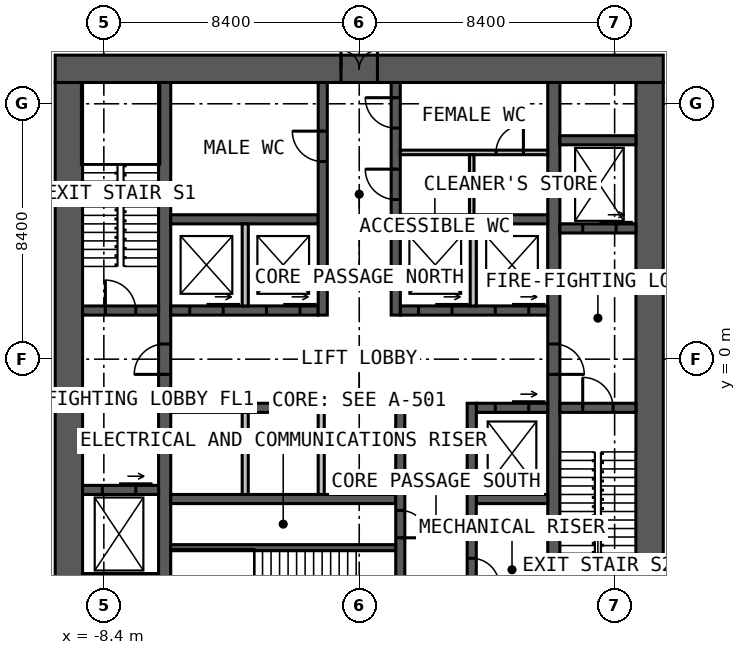
"""IFC4 building model, lengths in metres.
Left out: names, types, materials, properties, quantities, classifications, styles, units other than length and angle.
Written with IfcOpenShell. Run it as: python <this file> out.ifc"""

import sys

from ifc_helpers import new_model, si_unit, direction, frame, frame_2d, origin, place, context, subcontext, project, spatial, rectangle, extrude, element, fill, save


model = new_model("IFC4")
c1 = context("Model", 3, precision=1e-05, world=origin(), true_north=direction((0.0, 1.0)))
c2 = subcontext(c1, "Body", "Model", "MODEL_VIEW")
j1 = project(units=[si_unit("LENGTHUNIT", "METRE"), si_unit("PLANEANGLEUNIT", "RADIAN")], contexts=[c1])
p1 = place(None, origin())
s1 = spatial("IfcSite", under=j1, at=p1, CompositionType="ELEMENT")
p2 = place(p1, origin())
s2 = spatial("IfcBuilding", under=s1, at=p2, CompositionType="ELEMENT")
p3 = place(p2, frame((0.0, 0.0, -13.5)))
s3 = spatial("IfcBuildingStorey", under=s2, at=p3, CompositionType="ELEMENT", Elevation=-13.5)
p4 = place(p3, frame((-10.0, 9.55, 0.0), z_axis=(0.0, 0.0, 1.0), x_axis=(1.0, 0.0, 0.0)))
e1 = element("IfcWall", 1, at=p4, inside=s3, PredefinedType="SOLIDWALL", context=c2, shape_type="SweptSolid", body=[
    extrude(rectangle(XDim=20.0, YDim=0.9, at=frame_2d((10.0, 0.0))), origin(), (0.0, 0.0, 1.0), 4.5),
])
p5 = place(p4, frame((9.4, 0.0, 0.0)))
e2 = element("IfcOpeningElement", 2, at=p5, cuts=e1, PredefinedType="OPENING", context=c2, shape_type="SweptSolid", body=[
    extrude(rectangle(XDim=1.2, YDim=2.2, at=frame_2d((0.6, 1.1))), frame((0.0, 0.46, 0.0), z_axis=(0.0, -1.0, 0.0), x_axis=(1.0, 0.0, 0.0)), (0.0, 0.0, 1.0), 0.92),
])
for number, where, z_axis, x_axis in (
    (3, (9.55, -9.1, 0.0), (0.0, 0.0, 1.0), (0.0, 1.0, 0.0)),
    (4, (-9.55, 9.1, 0.0), (0.0, 0.0, 1.0), (0.0, -1.0, 0.0)),
):
    element("IfcWall", number, at=place(p3, frame(where, z_axis=z_axis, x_axis=x_axis)), inside=s3, PredefinedType="SOLIDWALL", context=c2, shape_type="SweptSolid", body=[
        extrude(rectangle(XDim=18.2, YDim=0.9, at=frame_2d((9.1, 0.0))), origin(), (0.0, 0.0, 1.0), 4.5),
    ])
p6 = place(p3, frame((-6.4, -9.1, 0.0), z_axis=(0.0, 0.0, 1.0), x_axis=(0.0, 1.0, 0.0)))
e5 = element("IfcWall", 5, at=p6, inside=s3, PredefinedType="SOLIDWALL", context=c2, shape_type="SweptSolid", body=[
    extrude(rectangle(XDim=18.2, YDim=0.4, at=frame_2d((9.1, 0.0))), origin(), (0.0, 0.0, 1.0), 4.5),
])
p7 = place(p6, frame((8.6, 0.0, 0.0)))
e6 = element("IfcOpeningElement", 6, at=p7, cuts=e5, PredefinedType="OPENING", context=c2, shape_type="SweptSolid", body=[
    extrude(rectangle(XDim=1.0, YDim=2.2, at=frame_2d((0.5, 1.1))), frame((0.0, 0.21, 0.0), z_axis=(0.0, -1.0, 0.0), x_axis=(1.0, 0.0, 0.0)), (0.0, 0.0, 1.0), 0.42),
])
p8 = place(p3, frame((6.4, 9.1, 0.0), z_axis=(0.0, 0.0, 1.0), x_axis=(0.0, -1.0, 0.0)))
e7 = element("IfcWall", 7, at=p8, inside=s3, PredefinedType="SOLIDWALL", context=c2, shape_type="SweptSolid", body=[
    extrude(rectangle(XDim=18.2, YDim=0.4, at=frame_2d((9.1, 0.0))), origin(), (0.0, 0.0, 1.0), 4.5),
])
p9 = place(p8, frame((8.6, 0.0, 0.0)))
e8 = element("IfcOpeningElement", 8, at=p9, cuts=e7, PredefinedType="OPENING", context=c2, shape_type="SweptSolid", body=[
    extrude(rectangle(XDim=1.0, YDim=2.2, at=frame_2d((0.5, 1.1))), frame((0.0, 0.21, 0.0), z_axis=(0.0, -1.0, 0.0), x_axis=(1.0, 0.0, 0.0)), (0.0, 0.0, 1.0), 0.42),
])
p10 = place(p3, frame((-6.2, 1.6, 0.0), z_axis=(0.0, 0.0, 1.0), x_axis=(1.0, 0.0, 0.0)))
e9 = element("IfcWall", 9, at=p10, inside=s3, PredefinedType="SOLIDWALL", context=c2, shape_type="SweptSolid", body=[
    extrude(rectangle(XDim=4.85, YDim=0.3, at=frame_2d((2.425, 0.0))), origin(), (0.0, 0.0, 1.0), 4.5),
])
p11 = place(p10, frame((0.625, 0.0, 0.0)))
e10 = element("IfcOpeningElement", 10, at=p11, cuts=e9, PredefinedType="OPENING", context=c2, shape_type="SweptSolid", body=[
    extrude(rectangle(XDim=1.1, YDim=2.2, at=frame_2d((0.55, 1.1))), frame((0.0, 0.16, 0.0), z_axis=(0.0, -1.0, 0.0), x_axis=(1.0, 0.0, 0.0)), (0.0, 0.0, 1.0), 0.32),
])
p12 = place(p10, frame((3.15, 0.0, 0.0)))
e11 = element("IfcOpeningElement", 11, at=p12, cuts=e9, PredefinedType="OPENING", context=c2, shape_type="SweptSolid", body=[
    extrude(rectangle(XDim=1.1, YDim=2.2, at=frame_2d((0.55, 1.1))), frame((0.0, 0.16, 0.0), z_axis=(0.0, -1.0, 0.0), x_axis=(1.0, 0.0, 0.0)), (0.0, 0.0, 1.0), 0.32),
])
p13 = place(p3, frame((1.35, 1.6, 0.0), z_axis=(0.0, 0.0, 1.0), x_axis=(1.0, 0.0, 0.0)))
e12 = element("IfcWall", 12, at=p13, inside=s3, PredefinedType="SOLIDWALL", context=c2, shape_type="SweptSolid", body=[
    extrude(rectangle(XDim=4.85, YDim=0.3, at=frame_2d((2.425, 0.0))), origin(), (0.0, 0.0, 1.0), 4.5),
])
p14 = place(p13, frame((0.6, 0.0, 0.0)))
e13 = element("IfcOpeningElement", 13, at=p14, cuts=e12, PredefinedType="OPENING", context=c2, shape_type="SweptSolid", body=[
    extrude(rectangle(XDim=1.1, YDim=2.2, at=frame_2d((0.55, 1.1))), frame((0.0, 0.16, 0.0), z_axis=(0.0, -1.0, 0.0), x_axis=(1.0, 0.0, 0.0)), (0.0, 0.0, 1.0), 0.32),
])
p15 = place(p13, frame((3.125, 0.0, 0.0)))
e14 = element("IfcOpeningElement", 14, at=p15, cuts=e12, PredefinedType="OPENING", context=c2, shape_type="SweptSolid", body=[
    extrude(rectangle(XDim=1.1, YDim=2.2, at=frame_2d((0.55, 1.1))), frame((0.0, 0.16, 0.0), z_axis=(0.0, -1.0, 0.0), x_axis=(1.0, 0.0, 0.0)), (0.0, 0.0, 1.0), 0.32),
])
for number, where, z_axis, x_axis in (
    (15, (-6.2, 4.6, 0.0), (0.0, 0.0, 1.0), (1.0, 0.0, 0.0)),
    (16, (1.35, 4.6, 0.0), (0.0, 0.0, 1.0), (1.0, 0.0, 0.0)),
):
    element("IfcWall", number, at=place(p3, frame(where, z_axis=z_axis, x_axis=x_axis)), inside=s3, PredefinedType="SOLIDWALL", context=c2, shape_type="SweptSolid", body=[
        extrude(rectangle(XDim=4.85, YDim=0.3, at=frame_2d((2.425, 0.0))), origin(), (0.0, 0.0, 1.0), 4.5),
    ])
p16 = place(p3, frame((-1.2, 1.45, 0.0), z_axis=(0.0, 0.0, 1.0), x_axis=(0.0, 1.0, 0.0)))
e17 = element("IfcWall", 17, at=p16, inside=s3, PredefinedType="SOLIDWALL", context=c2, shape_type="SweptSolid", body=[
    extrude(rectangle(XDim=7.65, YDim=0.3, at=frame_2d((3.825, 0.0))), origin(), (0.0, 0.0, 1.0), 4.5),
])
p17 = place(p16, frame((5.05, 0.0, 0.0)))
e18 = element("IfcOpeningElement", 18, at=p17, cuts=e17, PredefinedType="OPENING", context=c2, shape_type="SweptSolid", body=[
    extrude(rectangle(XDim=1.0, YDim=2.2, at=frame_2d((0.5, 1.1))), frame((0.0, 0.16, 0.0), z_axis=(0.0, -1.0, 0.0), x_axis=(1.0, 0.0, 0.0)), (0.0, 0.0, 1.0), 0.32),
])
p18 = place(p3, frame((1.2, 1.45, 0.0), z_axis=(0.0, 0.0, 1.0), x_axis=(0.0, 1.0, 0.0)))
e19 = element("IfcWall", 19, at=p18, inside=s3, PredefinedType="SOLIDWALL", context=c2, shape_type="SweptSolid", body=[
    extrude(rectangle(XDim=7.65, YDim=0.3, at=frame_2d((3.825, 0.0))), origin(), (0.0, 0.0, 1.0), 4.5),
])
p19 = place(p18, frame((3.8, 0.0, 0.0)))
e20 = element("IfcOpeningElement", 20, at=p19, cuts=e19, PredefinedType="OPENING", context=c2, shape_type="SweptSolid", body=[
    extrude(rectangle(XDim=1.0, YDim=2.2, at=frame_2d((0.5, 1.1))), frame((0.0, 0.16, 0.0), z_axis=(0.0, -1.0, 0.0), x_axis=(1.0, 0.0, 0.0)), (0.0, 0.0, 1.0), 0.32),
])
p20 = place(p18, frame((6.15, 0.0, 0.0)))
e21 = element("IfcOpeningElement", 21, at=p20, cuts=e19, PredefinedType="OPENING", context=c2, shape_type="SweptSolid", body=[
    extrude(rectangle(XDim=1.0, YDim=2.2, at=frame_2d((0.5, 1.1))), frame((0.0, 0.16, 0.0), z_axis=(0.0, -1.0, 0.0), x_axis=(1.0, 0.0, 0.0)), (0.0, 0.0, 1.0), 0.32),
])
p21 = place(p3, frame((-6.2, -1.6, 0.0), z_axis=(0.0, 0.0, 1.0), x_axis=(1.0, 0.0, 0.0)))
e22 = element("IfcWall", 22, at=p21, inside=s3, PredefinedType="SOLIDWALL", context=c2, shape_type="SweptSolid", body=[
    extrude(rectangle(XDim=7.4, YDim=0.3, at=frame_2d((3.7, 0.0))), origin(), (0.0, 0.0, 1.0), 4.5),
])
p22 = place(p3, frame((3.85, -1.6, 0.0), z_axis=(0.0, 0.0, 1.0), x_axis=(1.0, 0.0, 0.0)))
e23 = element("IfcWall", 23, at=p22, inside=s3, PredefinedType="SOLIDWALL", context=c2, shape_type="SweptSolid", body=[
    extrude(rectangle(XDim=2.35, YDim=0.3, at=frame_2d((1.175, 0.0))), origin(), (0.0, 0.0, 1.0), 4.5),
])
p23 = place(p22, frame((0.625, 0.0, 0.0)))
e24 = element("IfcOpeningElement", 24, at=p23, cuts=e23, PredefinedType="OPENING", context=c2, shape_type="SweptSolid", body=[
    extrude(rectangle(XDim=1.1, YDim=2.2, at=frame_2d((0.55, 1.1))), frame((0.0, 0.16, 0.0), z_axis=(0.0, -1.0, 0.0), x_axis=(1.0, 0.0, 0.0)), (0.0, 0.0, 1.0), 0.32),
])
p24 = place(p3, frame((-6.2, -4.6, 0.0), z_axis=(0.0, 0.0, 1.0), x_axis=(1.0, 0.0, 0.0)))
e25 = element("IfcWall", 25, at=p24, inside=s3, PredefinedType="SOLIDWALL", context=c2, shape_type="SweptSolid", body=[
    extrude(rectangle(XDim=7.4, YDim=0.3, at=frame_2d((3.7, 0.0))), origin(), (0.0, 0.0, 1.0), 4.5),
])
p25 = place(p3, frame((3.85, -4.6, 0.0), z_axis=(0.0, 0.0, 1.0), x_axis=(1.0, 0.0, 0.0)))
e26 = element("IfcWall", 26, at=p25, inside=s3, PredefinedType="SOLIDWALL", context=c2, shape_type="SweptSolid", body=[
    extrude(rectangle(XDim=2.35, YDim=0.3, at=frame_2d((1.175, 0.0))), origin(), (0.0, 0.0, 1.0), 4.5),
])
p26 = place(p3, frame((1.35, -1.45, 0.0), z_axis=(0.0, 0.0, 1.0), x_axis=(0.0, -1.0, 0.0)))
e27 = element("IfcWall", 27, at=p26, inside=s3, PredefinedType="SOLIDWALL", context=c2, shape_type="SweptSolid", body=[
    extrude(rectangle(XDim=7.65, YDim=0.3, at=frame_2d((3.825, 0.0))), origin(), (0.0, 0.0, 1.0), 4.5),
])
p27 = place(p26, frame((5.75, 0.0, 0.0)))
e28 = element("IfcOpeningElement", 28, at=p27, cuts=e27, PredefinedType="OPENING", context=c2, shape_type="SweptSolid", body=[
    extrude(rectangle(XDim=1.0, YDim=2.2, at=frame_2d((0.5, 1.1))), frame((0.0, 0.16, 0.0), z_axis=(0.0, -1.0, 0.0), x_axis=(1.0, 0.0, 0.0)), (0.0, 0.0, 1.0), 0.32),
])
p28 = place(p26, frame((3.525, 0.0, 0.0)))
e29 = element("IfcOpeningElement", 29, at=p28, cuts=e27, PredefinedType="OPENING", context=c2, shape_type="SweptSolid", body=[
    extrude(rectangle(XDim=0.9, YDim=2.2, at=frame_2d((0.45, 1.1))), frame((0.0, 0.16, 0.0), z_axis=(0.0, -1.0, 0.0), x_axis=(1.0, 0.0, 0.0)), (0.0, 0.0, 1.0), 0.32),
])
p29 = place(p3, frame((3.7, -1.45, 0.0), z_axis=(0.0, 0.0, 1.0), x_axis=(0.0, -1.0, 0.0)))
e30 = element("IfcWall", 30, at=p29, inside=s3, PredefinedType="SOLIDWALL", context=c2, shape_type="SweptSolid", body=[
    extrude(rectangle(XDim=7.65, YDim=0.3, at=frame_2d((3.825, 0.0))), origin(), (0.0, 0.0, 1.0), 4.5),
])
p30 = place(p29, frame((5.1, 0.0, 0.0)))
e31 = element("IfcOpeningElement", 31, at=p30, cuts=e30, PredefinedType="OPENING", context=c2, shape_type="SweptSolid", body=[
    extrude(rectangle(XDim=0.9, YDim=2.2, at=frame_2d((0.45, 1.1))), frame((0.0, 0.16, 0.0), z_axis=(0.0, -1.0, 0.0), x_axis=(1.0, 0.0, 0.0)), (0.0, 0.0, 1.0), 0.32),
])
p31 = place(p3, frame((-6.2, -6.2, 0.0), z_axis=(0.0, 0.0, 1.0), x_axis=(1.0, 0.0, 0.0)))
e32 = element("IfcWall", 32, at=p31, inside=s3, PredefinedType="SOLIDWALL", context=c2, shape_type="SweptSolid", body=[
    extrude(rectangle(XDim=7.4, YDim=0.2, at=frame_2d((3.7, 0.0))), origin(), (0.0, 0.0, 1.0), 4.5),
])
p32 = place(p3, frame((-9.1, 1.6, 0.0), z_axis=(0.0, 0.0, 1.0), x_axis=(1.0, 0.0, 0.0)))
e33 = element("IfcWall", 33, at=p32, inside=s3, PredefinedType="SOLIDWALL", context=c2, shape_type="SweptSolid", body=[
    extrude(rectangle(XDim=2.5, YDim=0.3, at=frame_2d((1.25, 0.0))), origin(), (0.0, 0.0, 1.0), 4.5),
])
p33 = place(p32, frame((0.75, 0.0, 0.0)))
e34 = element("IfcOpeningElement", 34, at=p33, cuts=e33, PredefinedType="OPENING", context=c2, shape_type="SweptSolid", body=[
    extrude(rectangle(XDim=1.0, YDim=2.2, at=frame_2d((0.5, 1.1))), frame((0.0, 0.16, 0.0), z_axis=(0.0, -1.0, 0.0), x_axis=(1.0, 0.0, 0.0)), (0.0, 0.0, 1.0), 0.32),
])
p34 = place(p3, frame((6.6, -1.6, 0.0), z_axis=(0.0, 0.0, 1.0), x_axis=(1.0, 0.0, 0.0)))
e35 = element("IfcWall", 35, at=p34, inside=s3, PredefinedType="SOLIDWALL", context=c2, shape_type="SweptSolid", body=[
    extrude(rectangle(XDim=2.5, YDim=0.3, at=frame_2d((1.25, 0.0))), origin(), (0.0, 0.0, 1.0), 4.5),
])
p35 = place(p34, frame((0.75, 0.0, 0.0)))
e36 = element("IfcOpeningElement", 36, at=p35, cuts=e35, PredefinedType="OPENING", context=c2, shape_type="SweptSolid", body=[
    extrude(rectangle(XDim=1.0, YDim=2.2, at=frame_2d((0.5, 1.1))), frame((0.0, 0.16, 0.0), z_axis=(0.0, -1.0, 0.0), x_axis=(1.0, 0.0, 0.0)), (0.0, 0.0, 1.0), 0.32),
])
p36 = place(p3, frame((-9.1, -4.3, 0.0), z_axis=(0.0, 0.0, 1.0), x_axis=(1.0, 0.0, 0.0)))
e37 = element("IfcWall", 37, at=p36, inside=s3, PredefinedType="SOLIDWALL", context=c2, shape_type="SweptSolid", body=[
    extrude(rectangle(XDim=2.5, YDim=0.3, at=frame_2d((1.25, 0.0))), origin(), (0.0, 0.0, 1.0), 4.5),
])
p37 = place(p36, frame((0.65, 0.0, 0.0)))
e38 = element("IfcOpeningElement", 38, at=p37, cuts=e37, PredefinedType="OPENING", context=c2, shape_type="SweptSolid", body=[
    extrude(rectangle(XDim=1.1, YDim=2.2, at=frame_2d((0.55, 1.1))), frame((0.0, 0.16, 0.0), z_axis=(0.0, -1.0, 0.0), x_axis=(1.0, 0.0, 0.0)), (0.0, 0.0, 1.0), 0.32),
])
p38 = place(p3, frame((6.6, 4.3, 0.0), z_axis=(0.0, 0.0, 1.0), x_axis=(1.0, 0.0, 0.0)))
e39 = element("IfcWall", 39, at=p38, inside=s3, PredefinedType="SOLIDWALL", context=c2, shape_type="SweptSolid", body=[
    extrude(rectangle(XDim=2.5, YDim=0.3, at=frame_2d((1.25, 0.0))), origin(), (0.0, 0.0, 1.0), 4.5),
])
p39 = place(p38, frame((0.75, 0.0, 0.0)))
e40 = element("IfcOpeningElement", 40, at=p39, cuts=e39, PredefinedType="OPENING", context=c2, shape_type="SweptSolid", body=[
    extrude(rectangle(XDim=1.1, YDim=2.2, at=frame_2d((0.55, 1.1))), frame((0.0, 0.16, 0.0), z_axis=(0.0, -1.0, 0.0), x_axis=(1.0, 0.0, 0.0)), (0.0, 0.0, 1.0), 0.32),
])
for number, where, z_axis, x_axis in (
    (41, (-9.1, -7.2, 0.0), (0.0, 0.0, 1.0), (1.0, 0.0, 0.0)),
    (42, (6.6, 7.2, 0.0), (0.0, 0.0, 1.0), (1.0, 0.0, 0.0)),
):
    element("IfcWall", number, at=place(p3, frame(where, z_axis=z_axis, x_axis=x_axis)), inside=s3, PredefinedType="SOLIDWALL", context=c2, shape_type="SweptSolid", body=[
        extrude(rectangle(XDim=2.5, YDim=0.3, at=frame_2d((1.25, 0.0))), origin(), (0.0, 0.0, 1.0), 4.5),
    ])
for number, where, z_axis, x_axis in (
    (43, (-3.75, 1.75, 0.0), (0.0, 0.0, 1.0), (0.0, 1.0, 0.0)),
    (44, (3.75, 1.75, 0.0), (0.0, 0.0, 1.0), (0.0, 1.0, 0.0)),
    (45, (-3.75, -1.75, 0.0), (0.0, 0.0, 1.0), (0.0, -1.0, 0.0)),
    (46, (-1.25, -1.75, 0.0), (0.0, 0.0, 1.0), (0.0, -1.0, 0.0)),
):
    element("IfcWall", number, at=place(p3, frame(where, z_axis=z_axis, x_axis=x_axis)), inside=s3, PredefinedType="SOLIDWALL", context=c2, shape_type="SweptSolid", body=[
        extrude(rectangle(XDim=2.7, YDim=0.2, at=frame_2d((1.35, 0.0))), origin(), (0.0, 0.0, 1.0), 4.25),
    ])
p40 = place(p3, frame((1.35, 6.8, 0.0), z_axis=(0.0, 0.0, 1.0), x_axis=(1.0, 0.0, 0.0)))
e47 = element("IfcWall", 47, at=p40, inside=s3, PredefinedType="PARTITIONING", context=c2, shape_type="SweptSolid", body=[
    extrude(rectangle(XDim=4.85, YDim=0.15, at=frame_2d((2.425, 0.0))), origin(), (0.0, 0.0, 1.0), 4.25),
])
p41 = place(p40, frame((3.15, 0.0, 0.0)))
e48 = element("IfcOpeningElement", 48, at=p41, cuts=e47, PredefinedType="OPENING", context=c2, shape_type="SweptSolid", body=[
    extrude(rectangle(XDim=0.9, YDim=2.2, at=frame_2d((0.45, 1.1))), frame((0.0, 0.085, 0.0), z_axis=(0.0, -1.0, 0.0), x_axis=(1.0, 0.0, 0.0)), (0.0, 0.0, 1.0), 0.17),
])
p42 = place(p3, frame((3.7, 4.75, 0.0), z_axis=(0.0, 0.0, 1.0), x_axis=(0.0, 1.0, 0.0)))
e49 = element("IfcWall", 49, at=p42, inside=s3, PredefinedType="PARTITIONING", context=c2, shape_type="SweptSolid", body=[
    extrude(rectangle(XDim=1.975, YDim=0.15, at=frame_2d((0.988, 0.0))), origin(), (0.0, 0.0, 1.0), 4.25),
])
p43 = place(p5, origin())
e50 = element("IfcDoor", 50, at=p43, inside=s3, OperationType="DOUBLE_DOOR_SINGLE_SWING", PredefinedType="DOOR", context=c2, shape_type="SweptSolid", body=[
    extrude(rectangle(XDim=1.2, YDim=2.2, at=frame_2d((0.6, 1.1))), frame((0.0, 0.025, 0.0), z_axis=(0.0, -1.0, 0.0), x_axis=(1.0, 0.0, 0.0)), (0.0, 0.0, 1.0), 0.05),
])
fill(e2, e50)
p44 = place(p7, origin())
e51 = element("IfcDoor", 51, at=p44, inside=s3, OperationType="SINGLE_SWING_LEFT", PredefinedType="DOOR", context=c2, shape_type="SweptSolid", body=[
    extrude(rectangle(XDim=1.0, YDim=2.2, at=frame_2d((0.5, 1.1))), frame((0.0, 0.025, 0.0), z_axis=(0.0, -1.0, 0.0), x_axis=(1.0, 0.0, 0.0)), (0.0, 0.0, 1.0), 0.05),
])
fill(e6, e51)
p45 = place(p9, origin())
e52 = element("IfcDoor", 52, at=p45, inside=s3, OperationType="SINGLE_SWING_RIGHT", PredefinedType="DOOR", context=c2, shape_type="SweptSolid", body=[
    extrude(rectangle(XDim=1.0, YDim=2.2, at=frame_2d((0.5, 1.1))), frame((0.0, 0.025, 0.0), z_axis=(0.0, -1.0, 0.0), x_axis=(1.0, 0.0, 0.0)), (0.0, 0.0, 1.0), 0.05),
])
fill(e8, e52)
p46 = place(p33, origin())
e53 = element("IfcDoor", 53, at=p46, inside=s3, OperationType="SINGLE_SWING_LEFT", PredefinedType="DOOR", context=c2, shape_type="SweptSolid", body=[
    extrude(rectangle(XDim=1.0, YDim=2.2, at=frame_2d((0.5, 1.1))), frame((0.0, 0.025, 0.0), z_axis=(0.0, -1.0, 0.0), x_axis=(1.0, 0.0, 0.0)), (0.0, 0.0, 1.0), 0.05),
])
fill(e34, e53)
p47 = place(p35, origin())
e54 = element("IfcDoor", 54, at=p47, inside=s3, OperationType="SINGLE_SWING_LEFT", PredefinedType="DOOR", context=c2, shape_type="SweptSolid", body=[
    extrude(rectangle(XDim=1.0, YDim=2.2, at=frame_2d((0.5, 1.1))), frame((0.0, 0.025, 0.0), z_axis=(0.0, -1.0, 0.0), x_axis=(1.0, 0.0, 0.0)), (0.0, 0.0, 1.0), 0.05),
])
fill(e36, e54)
p48 = place(p17, origin())
e55 = element("IfcDoor", 55, at=p48, inside=s3, OperationType="SINGLE_SWING_RIGHT", PredefinedType="DOOR", context=c2, shape_type="SweptSolid", body=[
    extrude(rectangle(XDim=1.0, YDim=2.2, at=frame_2d((0.5, 1.1))), frame((0.0, 0.025, 0.0), z_axis=(0.0, -1.0, 0.0), x_axis=(1.0, 0.0, 0.0)), (0.0, 0.0, 1.0), 0.05),
])
fill(e18, e55)
p49 = place(p19, origin())
e56 = element("IfcDoor", 56, at=p49, inside=s3, OperationType="SINGLE_SWING_RIGHT", PredefinedType="DOOR", context=c2, shape_type="SweptSolid", body=[
    extrude(rectangle(XDim=1.0, YDim=2.2, at=frame_2d((0.5, 1.1))), frame((0.0, 0.025, 0.0), z_axis=(0.0, -1.0, 0.0), x_axis=(1.0, 0.0, 0.0)), (0.0, 0.0, 1.0), 0.05),
])
fill(e20, e56)
p50 = place(p20, origin())
e57 = element("IfcDoor", 57, at=p50, inside=s3, OperationType="SINGLE_SWING_RIGHT", PredefinedType="DOOR", context=c2, shape_type="SweptSolid", body=[
    extrude(rectangle(XDim=1.0, YDim=2.2, at=frame_2d((0.5, 1.1))), frame((0.0, 0.025, 0.0), z_axis=(0.0, -1.0, 0.0), x_axis=(1.0, 0.0, 0.0)), (0.0, 0.0, 1.0), 0.05),
])
fill(e21, e57)
p51 = place(p28, origin())
e58 = element("IfcDoor", 58, at=p51, inside=s3, OperationType="SINGLE_SWING_RIGHT", PredefinedType="DOOR", context=c2, shape_type="SweptSolid", body=[
    extrude(rectangle(XDim=0.9, YDim=2.2, at=frame_2d((0.45, 1.1))), frame((0.0, 0.025, 0.0), z_axis=(0.0, -1.0, 0.0), x_axis=(1.0, 0.0, 0.0)), (0.0, 0.0, 1.0), 0.05),
])
fill(e29, e58)
p52 = place(p30, origin())
e59 = element("IfcDoor", 59, at=p52, inside=s3, OperationType="SINGLE_SWING_RIGHT", PredefinedType="DOOR", context=c2, shape_type="SweptSolid", body=[
    extrude(rectangle(XDim=0.9, YDim=2.2, at=frame_2d((0.45, 1.1))), frame((0.0, 0.025, 0.0), z_axis=(0.0, -1.0, 0.0), x_axis=(1.0, 0.0, 0.0)), (0.0, 0.0, 1.0), 0.05),
])
fill(e31, e59)
p53 = place(p41, origin())
e60 = element("IfcDoor", 60, at=p53, inside=s3, OperationType="SINGLE_SWING_RIGHT", PredefinedType="DOOR", context=c2, shape_type="SweptSolid", body=[
    extrude(rectangle(XDim=0.9, YDim=2.2, at=frame_2d((0.45, 1.1))), frame((0.0, 0.025, 0.0), z_axis=(0.0, -1.0, 0.0), x_axis=(1.0, 0.0, 0.0)), (0.0, 0.0, 1.0), 0.05),
])
fill(e48, e60)
p54 = place(p11, origin())
e61 = element("IfcDoor", 61, at=p54, inside=s3, OperationType="SLIDING_TO_LEFT", PredefinedType="DOOR", context=c2, shape_type="SweptSolid", body=[
    extrude(rectangle(XDim=1.1, YDim=2.2, at=frame_2d((0.55, 1.1))), frame((0.0, 0.025, 0.0), z_axis=(0.0, -1.0, 0.0), x_axis=(1.0, 0.0, 0.0)), (0.0, 0.0, 1.0), 0.05),
])
fill(e10, e61)
p55 = place(p12, origin())
e62 = element("IfcDoor", 62, at=p55, inside=s3, OperationType="SLIDING_TO_LEFT", PredefinedType="DOOR", context=c2, shape_type="SweptSolid", body=[
    extrude(rectangle(XDim=1.1, YDim=2.2, at=frame_2d((0.55, 1.1))), frame((0.0, 0.025, 0.0), z_axis=(0.0, -1.0, 0.0), x_axis=(1.0, 0.0, 0.0)), (0.0, 0.0, 1.0), 0.05),
])
fill(e11, e62)
p56 = place(p14, origin())
e63 = element("IfcDoor", 63, at=p56, inside=s3, OperationType="SLIDING_TO_LEFT", PredefinedType="DOOR", context=c2, shape_type="SweptSolid", body=[
    extrude(rectangle(XDim=1.1, YDim=2.2, at=frame_2d((0.55, 1.1))), frame((0.0, 0.025, 0.0), z_axis=(0.0, -1.0, 0.0), x_axis=(1.0, 0.0, 0.0)), (0.0, 0.0, 1.0), 0.05),
])
fill(e13, e63)
p57 = place(p15, origin())
e64 = element("IfcDoor", 64, at=p57, inside=s3, OperationType="SLIDING_TO_LEFT", PredefinedType="DOOR", context=c2, shape_type="SweptSolid", body=[
    extrude(rectangle(XDim=1.1, YDim=2.2, at=frame_2d((0.55, 1.1))), frame((0.0, 0.025, 0.0), z_axis=(0.0, -1.0, 0.0), x_axis=(1.0, 0.0, 0.0)), (0.0, 0.0, 1.0), 0.05),
])
fill(e14, e64)
p58 = place(p23, origin())
e65 = element("IfcDoor", 65, at=p58, inside=s3, OperationType="SLIDING_TO_LEFT", PredefinedType="DOOR", context=c2, shape_type="SweptSolid", body=[
    extrude(rectangle(XDim=1.1, YDim=2.2, at=frame_2d((0.55, 1.1))), frame((0.0, 0.025, 0.0), z_axis=(0.0, -1.0, 0.0), x_axis=(1.0, 0.0, 0.0)), (0.0, 0.0, 1.0), 0.05),
])
fill(e24, e65)
p59 = place(p37, origin())
e66 = element("IfcDoor", 66, at=p59, inside=s3, OperationType="SLIDING_TO_LEFT", PredefinedType="DOOR", context=c2, shape_type="SweptSolid", body=[
    extrude(rectangle(XDim=1.1, YDim=2.2, at=frame_2d((0.55, 1.1))), frame((0.0, 0.025, 0.0), z_axis=(0.0, -1.0, 0.0), x_axis=(1.0, 0.0, 0.0)), (0.0, 0.0, 1.0), 0.05),
])
fill(e38, e66)
p60 = place(p39, origin())
e67 = element("IfcDoor", 67, at=p60, inside=s3, OperationType="SLIDING_TO_LEFT", PredefinedType="DOOR", context=c2, shape_type="SweptSolid", body=[
    extrude(rectangle(XDim=1.1, YDim=2.2, at=frame_2d((0.55, 1.1))), frame((0.0, 0.025, 0.0), z_axis=(0.0, -1.0, 0.0), x_axis=(1.0, 0.0, 0.0)), (0.0, 0.0, 1.0), 0.05),
])
fill(e40, e67)
save(model, sys.argv[1])
